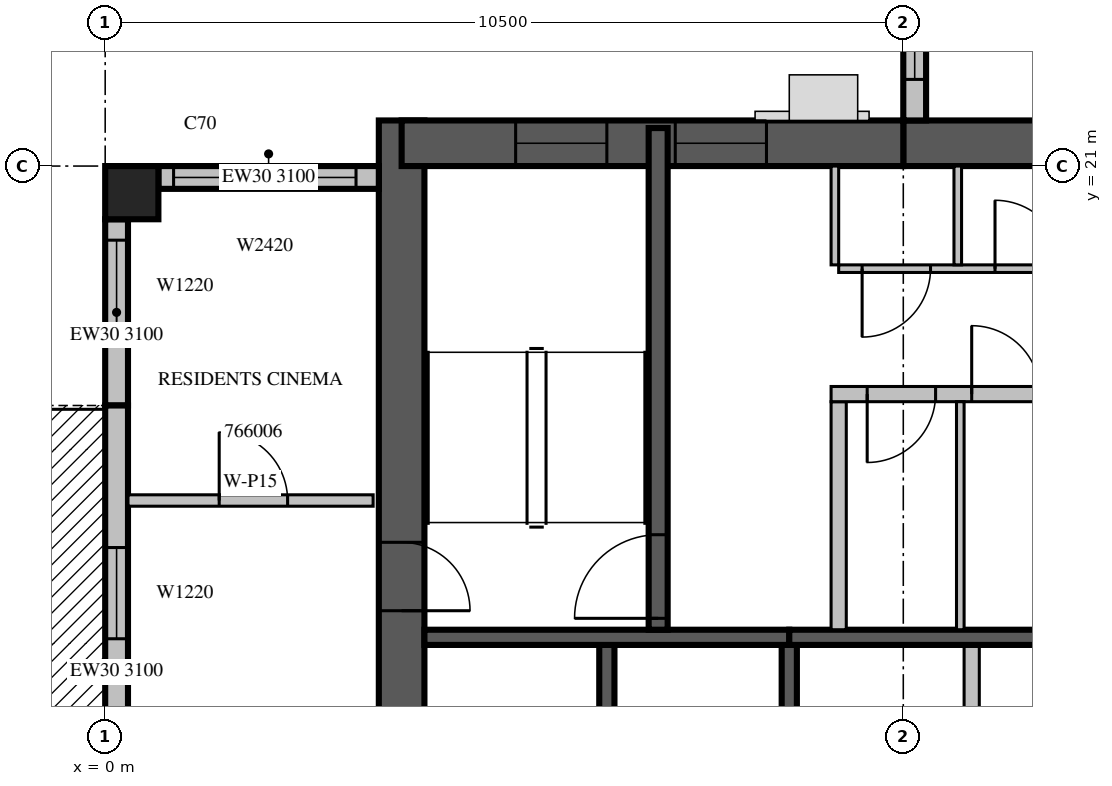
"""IFC4 building model, lengths in metres.
Left out: names, types, materials, properties, quantities, classifications, styles, units other than length and angle.
Written with IfcOpenShell. Run it as: python <this file> out.ifc"""

import sys

from ifc_helpers import new_model, si_unit, direction, frame, frame_2d, origin, origin_2d, place, context, subcontext, project, spatial, rectangle, extrude, source, transform, mapped, element, fill, save


model = new_model("IFC4")
c1 = context("Model", 3, precision=1e-05, world=origin(), true_north=direction((0.0, 1.0)))
c2 = subcontext(c1, "Body", "Model", "MODEL_VIEW")
j1 = project(units=[si_unit("LENGTHUNIT", "METRE"), si_unit("PLANEANGLEUNIT", "RADIAN")], contexts=[c1])
p1 = place(None, origin())
s1 = spatial("IfcSite", under=j1, at=p1, CompositionType="ELEMENT")
p2 = place(p1, origin())
s2 = spatial("IfcBuilding", under=s1, at=p2, CompositionType="ELEMENT")
p3 = place(p2, frame((0.0, 0.0, 291.5)))
s3 = spatial("IfcBuildingStorey", under=s2, at=p3, CompositionType="ELEMENT", Elevation=291.5)
m1 = source(origin(), c2, "Body", "SweptSolid", [
    extrude(rectangle(XDim=0.7, YDim=0.7, at=origin_2d()), origin(), (0.0, 0.0, 1.0), 3.5),
])
p4 = place(p3, frame((0.35, 20.65, 0.0), z_axis=(0.0, 0.0, 1.0), x_axis=(1.0, 0.0, 0.0)))
e1 = element("IfcColumn", 1, at=p4, inside=s3, PredefinedType="COLUMN", context=c2, shape_type="MappedRepresentation", body=[
    mapped(m1, transform((0.0, 0.0, 0.0), scale=1.0)),
])
m2 = source(origin(), c2, "Body", "SweptSolid", [
    extrude(rectangle(XDim=17.4, YDim=0.6, at=frame_2d((8.7, 0.0))), origin(), (0.0, 0.0, 1.0), 3.5),
])
p5 = place(p3, frame((3.9, 4.2, 0.0), z_axis=(0.0, 0.0, 1.0), x_axis=(0.0, 1.0, 0.0)))
e2 = element("IfcWall", 2, at=p5, inside=s3, PredefinedType="SHEAR", context=c2, shape_type="MappedRepresentation", body=[
    mapped(m2, transform((0.0, 0.0, 0.0), scale=1.0)),
])
m3 = source(origin(), c2, "Body", "SweptSolid", [
    extrude(rectangle(XDim=2.2, YDim=2.1, at=frame_2d((1.1, 1.05))), frame((0.0, 0.31, 0.0), z_axis=(0.0, -1.0, 0.0), x_axis=(1.0, 0.0, 0.0)), (0.0, 0.0, 1.0), 0.62),
])
p6 = place(p5, frame((4.2, 0.0, 0.0)))
e3 = element("IfcOpeningElement", 3, at=p6, cuts=e2, PredefinedType="OPENING", context=c2, shape_type="MappedRepresentation", body=[
    mapped(m3, transform((0.0, 0.0, 0.0), scale=1.0)),
])
m4 = source(origin(), c2, "Body", "SweptSolid", [
    extrude(rectangle(XDim=0.9, YDim=2.1, at=frame_2d((0.45, 1.05))), frame((0.0, 0.31, 0.0), z_axis=(0.0, -1.0, 0.0), x_axis=(1.0, 0.0, 0.0)), (0.0, 0.0, 1.0), 0.62),
])
p7 = place(p5, frame((10.95, 0.0, 0.0)))
e4 = element("IfcOpeningElement", 4, at=p7, cuts=e2, PredefinedType="OPENING", context=c2, shape_type="MappedRepresentation", body=[
    mapped(m4, transform((0.0, 0.0, 0.0), scale=1.0)),
])
m5 = source(origin(), c2, "Body", "SweptSolid", [
    extrude(rectangle(XDim=11.1, YDim=0.6, at=frame_2d((5.55, 0.0))), origin(), (0.0, 0.0, 1.0), 3.5),
])
p8 = place(p3, frame((10.5, 21.3, 0.0), z_axis=(0.0, 0.0, 1.0), x_axis=(1.0, 0.0, 0.0)))
e5 = element("IfcWall", 5, at=p8, inside=s3, PredefinedType="SHEAR", context=c2, shape_type="MappedRepresentation", body=[
    mapped(m5, transform((0.0, 0.0, 0.0), scale=1.0)),
])
m6 = source(origin(), c2, "Body", "SweptSolid", [
    extrude(rectangle(XDim=1.2, YDim=2.1, at=frame_2d((0.6, 1.05))), frame((0.0, 0.31, 0.0), z_axis=(0.0, -1.0, 0.0), x_axis=(1.0, 0.0, 0.0)), (0.0, 0.0, 1.0), 0.62),
])
p9 = place(p8, frame((8.7, 0.0, 0.0)))
e6 = element("IfcOpeningElement", 6, at=p9, cuts=e5, PredefinedType="OPENING", context=c2, shape_type="MappedRepresentation", body=[
    mapped(m6, transform((0.0, 0.0, 0.0), scale=1.0)),
])
m7 = source(origin(), c2, "Body", "SweptSolid", [
    extrude(rectangle(XDim=6.6, YDim=0.6, at=frame_2d((3.3, 0.0))), origin(), (0.0, 0.0, 1.0), 3.5),
])
p10 = place(p3, frame((3.9, 21.3, 0.0), z_axis=(0.0, 0.0, 1.0), x_axis=(1.0, 0.0, 0.0)))
e7 = element("IfcWall", 7, at=p10, inside=s3, PredefinedType="SHEAR", context=c2, shape_type="MappedRepresentation", body=[
    mapped(m7, transform((0.0, 0.0, 0.0), scale=1.0)),
])
m8 = source(origin(), c2, "Body", "SweptSolid", [
    extrude(rectangle(XDim=1.2, YDim=2.4, at=frame_2d((0.6, 1.2))), frame((0.0, 0.31, 0.0), z_axis=(0.0, -1.0, 0.0), x_axis=(1.0, 0.0, 0.0)), (0.0, 0.0, 1.0), 0.62),
])
p11 = place(p10, frame((1.5, 0.0, 0.6)))
e8 = element("IfcOpeningElement", 8, at=p11, cuts=e7, PredefinedType="OPENING", context=c2, shape_type="MappedRepresentation", body=[
    mapped(m8, transform((0.0, 0.0, 0.0), scale=1.0)),
])
p12 = place(p10, frame((3.6, 0.0, 0.6)))
e9 = element("IfcOpeningElement", 9, at=p12, cuts=e7, PredefinedType="OPENING", context=c2, shape_type="MappedRepresentation", body=[
    mapped(m8, transform((0.0, 0.0, 0.0), scale=1.0)),
])
m9 = source(origin(), c2, "Body", "SweptSolid", [
    extrude(rectangle(XDim=5.28, YDim=0.3, at=frame_2d((2.64, 0.0))), origin(), (0.0, 0.0, 1.0), 3.1),
])
p13 = place(p3, frame((10.65, 26.88, 0.0), z_axis=(0.0, 0.0, 1.0), x_axis=(0.0, -1.0, 0.0)))
e10 = element("IfcWall", 10, at=p13, inside=s3, PredefinedType="STANDARD", context=c2, shape_type="MappedRepresentation", body=[
    mapped(m9, transform((0.0, 0.0, 0.0), scale=1.0)),
])
m10 = source(origin(), c2, "Body", "SweptSolid", [
    extrude(rectangle(XDim=3.6, YDim=2.0, at=frame_2d((1.8, 1.0))), frame((0.0, 0.16, 0.0), z_axis=(0.0, -1.0, 0.0), x_axis=(1.0, 0.0, 0.0)), (0.0, 0.0, 1.0), 0.32),
])
p14 = place(p13, frame((1.14, 0.0, 0.6)))
e11 = element("IfcOpeningElement", 11, at=p14, cuts=e10, PredefinedType="OPENING", context=c2, shape_type="MappedRepresentation", body=[
    mapped(m10, transform((0.0, 0.0, 0.0), scale=1.0)),
])
m11 = source(origin(), c2, "Body", "SweptSolid", [
    extrude(rectangle(XDim=2.9, YDim=0.3, at=frame_2d((1.45, 0.0))), origin(), (0.0, 0.0, 1.0), 3.1),
])
p15 = place(p3, frame((3.6, 20.85, 0.0), z_axis=(0.0, 0.0, 1.0), x_axis=(-1.0, 0.0, 0.0)))
e12 = element("IfcWall", 12, at=p15, inside=s3, PredefinedType="STANDARD", context=c2, shape_type="MappedRepresentation", body=[
    mapped(m11, transform((0.0, 0.0, 0.0), scale=1.0)),
])
m12 = source(origin(), c2, "Body", "SweptSolid", [
    extrude(rectangle(XDim=2.4, YDim=2.0, at=frame_2d((1.2, 1.0))), frame((0.0, 0.16, 0.0), z_axis=(0.0, -1.0, 0.0), x_axis=(1.0, 0.0, 0.0)), (0.0, 0.0, 1.0), 0.32),
])
p16 = place(p15, frame((0.3, 0.0, 0.6)))
e13 = element("IfcOpeningElement", 13, at=p16, cuts=e12, PredefinedType="OPENING", context=c2, shape_type="MappedRepresentation", body=[
    mapped(m12, transform((0.0, 0.0, 0.0), scale=1.0)),
])
p17 = place(p3, frame((0.15, 20.3, 0.0), z_axis=(0.0, 0.0, 1.0), x_axis=(0.0, -1.0, 0.0)))
e14 = element("IfcWall", 14, at=p17, inside=s3, PredefinedType="STANDARD", context=c2, shape_type="SweptSolid", body=[
    extrude(rectangle(XDim=2.45, YDim=0.3, at=frame_2d((1.225, 0.0))), origin(), (0.0, 0.0, 1.0), 3.1),
])
m13 = source(origin(), c2, "Body", "SweptSolid", [
    extrude(rectangle(XDim=1.2, YDim=2.0, at=frame_2d((0.6, 1.0))), frame((0.0, 0.16, 0.0), z_axis=(0.0, -1.0, 0.0), x_axis=(1.0, 0.0, 0.0)), (0.0, 0.0, 1.0), 0.32),
])
p18 = place(p17, frame((0.275, 0.0, 0.6)))
e15 = element("IfcOpeningElement", 15, at=p18, cuts=e14, PredefinedType="OPENING", context=c2, shape_type="MappedRepresentation", body=[
    mapped(m13, transform((0.0, 0.0, 0.0), scale=1.0)),
])
p19 = place(p3, frame((0.15, 17.85, 0.0), z_axis=(0.0, 0.0, 1.0), x_axis=(0.0, -1.0, 0.0)))
e16 = element("IfcWall", 16, at=p19, inside=s3, PredefinedType="STANDARD", context=c2, shape_type="SweptSolid", body=[
    extrude(rectangle(XDim=7.0, YDim=0.3, at=frame_2d((3.5, 0.0))), origin(), (0.0, 0.0, 1.0), 3.1),
])
m14 = source(origin(), c2, "Body", "SweptSolid", [
    extrude(rectangle(XDim=1.8, YDim=2.4, at=frame_2d((0.9, 1.2))), frame((0.0, 0.16, 0.0), z_axis=(0.0, -1.0, 0.0), x_axis=(1.0, 0.0, 0.0)), (0.0, 0.0, 1.0), 0.32),
])
p20 = place(p19, frame((4.725, 0.0, 0.0)))
e17 = element("IfcOpeningElement", 17, at=p20, cuts=e16, PredefinedType="OPENING", context=c2, shape_type="MappedRepresentation", body=[
    mapped(m14, transform((0.0, 0.0, 0.0), scale=1.0)),
])
p21 = place(p19, frame((1.869, 0.0, 0.6)))
e18 = element("IfcOpeningElement", 18, at=p21, cuts=e16, PredefinedType="OPENING", context=c2, shape_type="MappedRepresentation", body=[
    mapped(m13, transform((0.0, 0.0, 0.0), scale=1.0)),
])
m15 = source(origin(), c2, "Body", "SweptSolid", [
    extrude(rectangle(XDim=3.0, YDim=0.2, at=frame_2d((1.5, 0.0))), origin(), (0.0, 0.0, 1.0), 3.5),
])
p22 = place(p3, frame((6.6, 11.7, 0.0), z_axis=(0.0, 0.0, 1.0), x_axis=(0.0, 1.0, 0.0)))
e19 = element("IfcWall", 19, at=p22, inside=s3, PredefinedType="SOLIDWALL", context=c2, shape_type="MappedRepresentation", body=[
    mapped(m15, transform((0.0, 0.0, 0.0), scale=1.0)),
])
m16 = source(origin(), c2, "Body", "SweptSolid", [
    extrude(rectangle(XDim=3.0, YDim=0.2, at=frame_2d((1.5, 0.0))), origin(), (0.0, 0.0, 1.0), 3.1),
])
p23 = place(p3, frame((9.0, 11.7, 0.0), z_axis=(0.0, 0.0, 1.0), x_axis=(0.0, 1.0, 0.0)))
e20 = element("IfcWall", 20, at=p23, inside=s3, PredefinedType="SOLIDWALL", context=c2, shape_type="MappedRepresentation", body=[
    mapped(m16, transform((0.0, 0.0, 0.0), scale=1.0)),
])
m17 = source(origin(), c2, "Body", "SweptSolid", [
    extrude(rectangle(XDim=3.0, YDim=0.2, at=frame_2d((1.5, 0.0))), origin(), (0.0, 0.0, 1.0), 3.1),
])
p24 = place(p3, frame((11.4, 11.7, 0.0), z_axis=(0.0, 0.0, 1.0), x_axis=(0.0, 1.0, 0.0)))
e21 = element("IfcWall", 21, at=p24, inside=s3, PredefinedType="PARTITIONING", context=c2, shape_type="MappedRepresentation", body=[
    mapped(m17, transform((0.0, 0.0, 0.0), scale=1.0)),
])
m18 = source(origin(), c2, "Body", "SweptSolid", [
    extrude(rectangle(XDim=4.8, YDim=0.2, at=frame_2d((2.4, 0.0))), origin(), (0.0, 0.0, 1.0), 3.5),
])
p25 = place(p3, frame((4.2, 14.8, 0.0), z_axis=(0.0, 0.0, 1.0), x_axis=(1.0, 0.0, 0.0)))
e22 = element("IfcWall", 22, at=p25, inside=s3, PredefinedType="SOLIDWALL", context=c2, shape_type="MappedRepresentation", body=[
    mapped(m18, transform((0.0, 0.0, 0.0), scale=1.0)),
])
m19 = source(origin(), c2, "Body", "SweptSolid", [
    extrude(rectangle(XDim=4.8, YDim=0.2, at=frame_2d((2.4, 0.0))), origin(), (0.0, 0.0, 1.0), 3.1),
])
p26 = place(p3, frame((9.0, 14.8, 0.0), z_axis=(0.0, 0.0, 1.0), x_axis=(1.0, 0.0, 0.0)))
e23 = element("IfcWall", 23, at=p26, inside=s3, PredefinedType="SOLIDWALL", context=c2, shape_type="MappedRepresentation", body=[
    mapped(m19, transform((0.0, 0.0, 0.0), scale=1.0)),
])
m20 = source(origin(), c2, "Body", "SweptSolid", [
    extrude(rectangle(XDim=6.6, YDim=0.25, at=frame_2d((3.3, 0.0))), origin(), (0.0, 0.0, 1.0), 3.1),
])
p27 = place(p3, frame((7.275, 14.9, 0.0), z_axis=(0.0, 0.0, 1.0), x_axis=(0.0, 1.0, 0.0)))
e24 = element("IfcWall", 24, at=p27, inside=s3, PredefinedType="SOLIDWALL", context=c2, shape_type="MappedRepresentation", body=[
    mapped(m20, transform((0.0, 0.0, 0.0), scale=1.0)),
])
m21 = source(origin(), c2, "Body", "SweptSolid", [
    extrude(rectangle(XDim=1.1, YDim=2.1, at=frame_2d((0.55, 1.05))), frame((0.0, 0.135, 0.0), z_axis=(0.0, -1.0, 0.0), x_axis=(1.0, 0.0, 0.0)), (0.0, 0.0, 1.0), 0.27),
])
p28 = place(p27, frame((0.15, 0.0, 0.0)))
e25 = element("IfcOpeningElement", 25, at=p28, cuts=e24, PredefinedType="OPENING", context=c2, shape_type="MappedRepresentation", body=[
    mapped(m21, transform((0.0, 0.0, 0.0), scale=1.0)),
])
p29 = place(p3, frame((9.65, 14.9, 0.0), z_axis=(0.0, 0.0, 1.0), x_axis=(0.0, 1.0, 0.0)))
e26 = element("IfcWall", 26, at=p29, inside=s3, PredefinedType="PARTITIONING", context=c2, shape_type="MappedRepresentation", body=[
    mapped(m17, transform((0.0, 0.0, 0.0), scale=1.0)),
])
m22 = source(origin(), c2, "Body", "SweptSolid", [
    extrude(rectangle(XDim=11.45, YDim=0.2, at=frame_2d((5.725, 0.0))), origin(), (0.0, 0.0, 1.0), 3.1),
])
p30 = place(p3, frame((9.55, 18.0, 0.0), z_axis=(0.0, 0.0, 1.0), x_axis=(1.0, 0.0, 0.0)))
e27 = element("IfcWall", 27, at=p30, inside=s3, PredefinedType="PARTITIONING", context=c2, shape_type="MappedRepresentation", body=[
    mapped(m22, transform((0.0, 0.0, 0.0), scale=1.0)),
])
m23 = source(origin(), c2, "Body", "SweptSolid", [
    extrude(rectangle(XDim=0.9, YDim=2.1, at=frame_2d((0.45, 1.05))), frame((0.0, 0.11, 0.0), z_axis=(0.0, -1.0, 0.0), x_axis=(1.0, 0.0, 0.0)), (0.0, 0.0, 1.0), 0.22),
])
p31 = place(p30, frame((0.475, 0.0, 0.0)))
e28 = element("IfcOpeningElement", 28, at=p31, cuts=e27, PredefinedType="OPENING", context=c2, shape_type="MappedRepresentation", body=[
    mapped(m23, transform((0.0, 0.0, 0.0), scale=1.0)),
])
p32 = place(p30, frame((1.85, 0.0, 0.0)))
e29 = element("IfcOpeningElement", 29, at=p32, cuts=e27, PredefinedType="OPENING", context=c2, shape_type="MappedRepresentation", body=[
    mapped(m23, transform((0.0, 0.0, 0.0), scale=1.0)),
])
p33 = place(p30, frame((3.125, 0.0, 0.0)))
e30 = element("IfcOpeningElement", 30, at=p33, cuts=e27, PredefinedType="OPENING", context=c2, shape_type="MappedRepresentation", body=[
    mapped(m23, transform((0.0, 0.0, 0.0), scale=1.0)),
])
m24 = source(origin(), c2, "Body", "SweptSolid", [
    extrude(rectangle(XDim=1.1, YDim=2.1, at=frame_2d((0.55, 1.05))), frame((0.0, 0.11, 0.0), z_axis=(0.0, -1.0, 0.0), x_axis=(1.0, 0.0, 0.0)), (0.0, 0.0, 1.0), 0.22),
])
p34 = place(p30, frame((7.35, 0.0, 0.0)))
e31 = element("IfcOpeningElement", 31, at=p34, cuts=e27, PredefinedType="OPENING", context=c2, shape_type="MappedRepresentation", body=[
    mapped(m24, transform((0.0, 0.0, 0.0), scale=1.0)),
])
p35 = place(p3, frame((9.65, 19.65, 0.0), z_axis=(0.0, 0.0, 1.0), x_axis=(1.0, 0.0, 0.0)))
e32 = element("IfcWall", 32, at=p35, inside=s3, PredefinedType="PARTITIONING", context=c2, shape_type="SweptSolid", body=[
    extrude(rectangle(XDim=9.4, YDim=0.1, at=frame_2d((4.7, 0.0))), origin(), (0.0, 0.0, 1.0), 3.1),
])
p36 = place(p35, frame((0.308, 0.0, 0.0)))
e33 = element("IfcOpeningElement", 33, at=p36, cuts=e32, PredefinedType="OPENING", context=c2, shape_type="SweptSolid", body=[
    extrude(rectangle(XDim=0.9, YDim=2.1, at=frame_2d((0.45, 1.05))), frame((0.0, 0.06, 0.0), z_axis=(0.0, -1.0, 0.0), x_axis=(1.0, 0.0, 0.0)), (0.0, 0.0, 1.0), 0.12),
])
m25 = source(origin(), c2, "Body", "SweptSolid", [
    extrude(rectangle(XDim=0.9, YDim=2.1, at=frame_2d((0.45, 1.05))), frame((0.0, 0.06, 0.0), z_axis=(0.0, -1.0, 0.0), x_axis=(1.0, 0.0, 0.0)), (0.0, 0.0, 1.0), 0.12),
])
p37 = place(p35, frame((2.057, 0.0, 0.0)))
e34 = element("IfcOpeningElement", 34, at=p37, cuts=e32, PredefinedType="OPENING", context=c2, shape_type="MappedRepresentation", body=[
    mapped(m25, transform((0.0, 0.0, 0.0), scale=1.0)),
])
p38 = place(p35, frame((4.172, 0.0, 0.0)))
e35 = element("IfcOpeningElement", 35, at=p38, cuts=e32, PredefinedType="OPENING", context=c2, shape_type="MappedRepresentation", body=[
    mapped(m25, transform((0.0, 0.0, 0.0), scale=1.0)),
])
p39 = place(p35, frame((6.13, 0.0, 0.0)))
e36 = element("IfcOpeningElement", 36, at=p39, cuts=e32, PredefinedType="OPENING", context=c2, shape_type="MappedRepresentation", body=[
    mapped(m25, transform((0.0, 0.0, 0.0), scale=1.0)),
])
p40 = place(p35, frame((7.957, 0.0, 0.0)))
e37 = element("IfcOpeningElement", 37, at=p40, cuts=e32, PredefinedType="OPENING", context=c2, shape_type="MappedRepresentation", body=[
    mapped(m25, transform((0.0, 0.0, 0.0), scale=1.0)),
])
p41 = place(p3, frame((11.217, 19.7, 0.0), z_axis=(0.0, 0.0, 1.0), x_axis=(0.0, 1.0, 0.0)))
e38 = element("IfcWall", 38, at=p41, inside=s3, PredefinedType="PARTITIONING", context=c2, shape_type="SweptSolid", body=[
    extrude(rectangle(XDim=1.3, YDim=0.1, at=frame_2d((0.65, 0.0))), origin(), (0.0, 0.0, 1.0), 3.1),
])
m26 = source(origin(), c2, "Body", "SweptSolid", [
    extrude(rectangle(XDim=1.3, YDim=0.1, at=frame_2d((0.65, 0.0))), origin(), (0.0, 0.0, 1.0), 3.1),
])
p42 = place(p3, frame((9.6, 19.7, 0.0), z_axis=(0.0, 0.0, 1.0), x_axis=(0.0, 1.0, 0.0)))
e39 = element("IfcWall", 39, at=p42, inside=s3, PredefinedType="PARTITIONING", context=c2, shape_type="MappedRepresentation", body=[
    mapped(m26, transform((0.0, 0.0, 0.0), scale=1.0)),
])
m27 = source(origin(), c2, "Body", "SweptSolid", [
    extrude(rectangle(XDim=3.0, YDim=0.1, at=frame_2d((1.5, 0.0))), origin(), (0.0, 0.0, 1.0), 3.1),
])
p43 = place(p3, frame((11.25, 14.9, 0.0), z_axis=(0.0, 0.0, 1.0), x_axis=(0.0, 1.0, 0.0)))
e40 = element("IfcWall", 40, at=p43, inside=s3, PredefinedType="PARTITIONING", context=c2, shape_type="MappedRepresentation", body=[
    mapped(m27, transform((0.0, 0.0, 0.0), scale=1.0)),
])
m28 = source(origin(), c2, "Body", "SweptSolid", [
    extrude(rectangle(XDim=3.225, YDim=0.15, at=frame_2d((1.613, 0.0))), origin(), (0.0, 0.0, 1.0), 3.1),
])
p44 = place(p3, frame((0.3, 16.6, 0.0), z_axis=(0.0, 0.0, 1.0), x_axis=(1.0, 0.0, 0.0)))
e41 = element("IfcWall", 41, at=p44, inside=s3, PredefinedType="PARTITIONING", context=c2, shape_type="MappedRepresentation", body=[
    mapped(m28, transform((0.0, 0.0, 0.0), scale=1.0)),
])
m29 = source(origin(), c2, "Body", "SweptSolid", [
    extrude(rectangle(XDim=0.9, YDim=2.1, at=frame_2d((0.45, 1.05))), frame((0.0, 0.085, 0.0), z_axis=(0.0, -1.0, 0.0), x_axis=(1.0, 0.0, 0.0)), (0.0, 0.0, 1.0), 0.17),
])
p45 = place(p44, frame((1.2, 0.0, 0.0)))
e42 = element("IfcOpeningElement", 42, at=p45, cuts=e41, PredefinedType="OPENING", context=c2, shape_type="MappedRepresentation", body=[
    mapped(m29, transform((0.0, 0.0, 0.0), scale=1.0)),
])
m30 = source(origin(), c2, "Body", "SweptSolid", [
    extrude(rectangle(XDim=3.6, YDim=2.0, at=frame_2d((1.8, 1.0))), frame((0.0, 0.03, 0.0), z_axis=(0.0, -1.0, 0.0), x_axis=(1.0, 0.0, 0.0)), (0.0, 0.0, 1.0), 0.06),
])
p46 = place(p14, origin())
e43 = element("IfcWindow", 43, at=p46, inside=s3, PartitioningType="SINGLE_PANEL", PredefinedType="WINDOW", context=c2, shape_type="MappedRepresentation", body=[
    mapped(m30, transform((0.0, 0.0, 0.0), scale=1.0)),
])
fill(e11, e43)
m31 = source(origin(), c2, "Body", "SweptSolid", [
    extrude(rectangle(XDim=2.4, YDim=2.0, at=frame_2d((1.2, 1.0))), frame((0.0, 0.03, 0.0), z_axis=(0.0, -1.0, 0.0), x_axis=(1.0, 0.0, 0.0)), (0.0, 0.0, 1.0), 0.06),
])
p47 = place(p16, origin())
e44 = element("IfcWindow", 44, at=p47, inside=s3, PartitioningType="SINGLE_PANEL", PredefinedType="WINDOW", context=c2, shape_type="MappedRepresentation", body=[
    mapped(m31, transform((0.0, 0.0, 0.0), scale=1.0)),
])
fill(e13, e44)
m32 = source(origin(), c2, "Body", "SweptSolid", [
    extrude(rectangle(XDim=1.2, YDim=2.0, at=frame_2d((0.6, 1.0))), frame((0.0, 0.03, 0.0), z_axis=(0.0, -1.0, 0.0), x_axis=(1.0, 0.0, 0.0)), (0.0, 0.0, 1.0), 0.06),
])
p48 = place(p18, origin())
e45 = element("IfcWindow", 45, at=p48, inside=s3, PartitioningType="SINGLE_PANEL", PredefinedType="WINDOW", context=c2, shape_type="MappedRepresentation", body=[
    mapped(m32, transform((0.0, 0.0, 0.0), scale=1.0)),
])
fill(e15, e45)
p49 = place(p21, origin())
e46 = element("IfcWindow", 46, at=p49, inside=s3, PartitioningType="SINGLE_PANEL", PredefinedType="WINDOW", context=c2, shape_type="MappedRepresentation", body=[
    mapped(m32, transform((0.0, 0.0, 0.0), scale=1.0)),
])
fill(e18, e46)
m33 = source(origin(), c2, "Body", "SweptSolid", [
    extrude(rectangle(XDim=1.1, YDim=2.1, at=frame_2d((0.55, 1.05))), frame((0.0, 0.025, 0.0), z_axis=(0.0, -1.0, 0.0), x_axis=(1.0, 0.0, 0.0)), (0.0, 0.0, 1.0), 0.05),
])
p50 = place(p28, origin())
e47 = element("IfcDoor", 47, at=p50, inside=s3, OperationType="SINGLE_SWING_LEFT", PredefinedType="DOOR", context=c2, shape_type="MappedRepresentation", body=[
    mapped(m33, transform((0.0, 0.0, 0.0), scale=1.0)),
])
fill(e25, e47)
m34 = source(origin(), c2, "Body", "SweptSolid", [
    extrude(rectangle(XDim=0.9, YDim=2.1, at=frame_2d((0.45, 1.05))), frame((0.0, 0.025, 0.0), z_axis=(0.0, -1.0, 0.0), x_axis=(1.0, 0.0, 0.0)), (0.0, 0.0, 1.0), 0.05),
])
p51 = place(p31, origin())
e48 = element("IfcDoor", 48, at=p51, inside=s3, OperationType="SINGLE_SWING_RIGHT", PredefinedType="DOOR", context=c2, shape_type="MappedRepresentation", body=[
    mapped(m34, transform((0.0, 0.0, 0.0), scale=1.0)),
])
fill(e28, e48)
p52 = place(p32, origin())
e49 = element("IfcDoor", 49, at=p52, inside=s3, OperationType="SINGLE_SWING_LEFT", PredefinedType="DOOR", context=c2, shape_type="MappedRepresentation", body=[
    mapped(m34, transform((0.0, 0.0, 0.0), scale=1.0)),
])
fill(e29, e49)
p53 = place(p36, origin())
e50 = element("IfcDoor", 50, at=p53, inside=s3, OperationType="SINGLE_SWING_RIGHT", PredefinedType="DOOR", context=c2, shape_type="MappedRepresentation", body=[
    mapped(m34, transform((0.0, 0.0, 0.0), scale=1.0)),
])
fill(e33, e50)
p54 = place(p37, origin())
e51 = element("IfcDoor", 51, at=p54, inside=s3, OperationType="SINGLE_SWING_LEFT", PredefinedType="DOOR", context=c2, shape_type="MappedRepresentation", body=[
    mapped(m34, transform((0.0, 0.0, 0.0), scale=1.0)),
])
fill(e34, e51)
p55 = place(p7, origin())
e52 = element("IfcDoor", 52, at=p55, inside=s3, OperationType="SINGLE_SWING_RIGHT", PredefinedType="DOOR", context=c2, shape_type="MappedRepresentation", body=[
    mapped(m34, transform((0.0, 0.0, 0.0), scale=1.0)),
])
fill(e4, e52)
m35 = source(origin(), c2, "Body", "SweptSolid", [
    extrude(rectangle(XDim=1.2, YDim=2.4, at=frame_2d((0.6, 1.2))), frame((0.0, 0.03, 0.0), z_axis=(0.0, -1.0, 0.0), x_axis=(1.0, 0.0, 0.0)), (0.0, 0.0, 1.0), 0.06),
])
p56 = place(p11, origin())
e53 = element("IfcWindow", 53, at=p56, inside=s3, PartitioningType="SINGLE_PANEL", PredefinedType="WINDOW", context=c2, shape_type="MappedRepresentation", body=[
    mapped(m35, transform((0.0, 0.0, 0.0), scale=1.0)),
])
fill(e8, e53)
p57 = place(p12, origin())
e54 = element("IfcWindow", 54, at=p57, inside=s3, PartitioningType="SINGLE_PANEL", PredefinedType="WINDOW", context=c2, shape_type="MappedRepresentation", body=[
    mapped(m35, transform((0.0, 0.0, 0.0), scale=1.0)),
])
fill(e9, e54)
p58 = place(p45, origin())
e55 = element("IfcDoor", 55, at=p58, inside=s3, OperationType="SINGLE_SWING_LEFT", PredefinedType="DOOR", context=c2, shape_type="MappedRepresentation", body=[
    mapped(m34, transform((0.0, 0.0, 0.0), scale=1.0)),
])
fill(e42, e55)
save(model, sys.argv[1])
